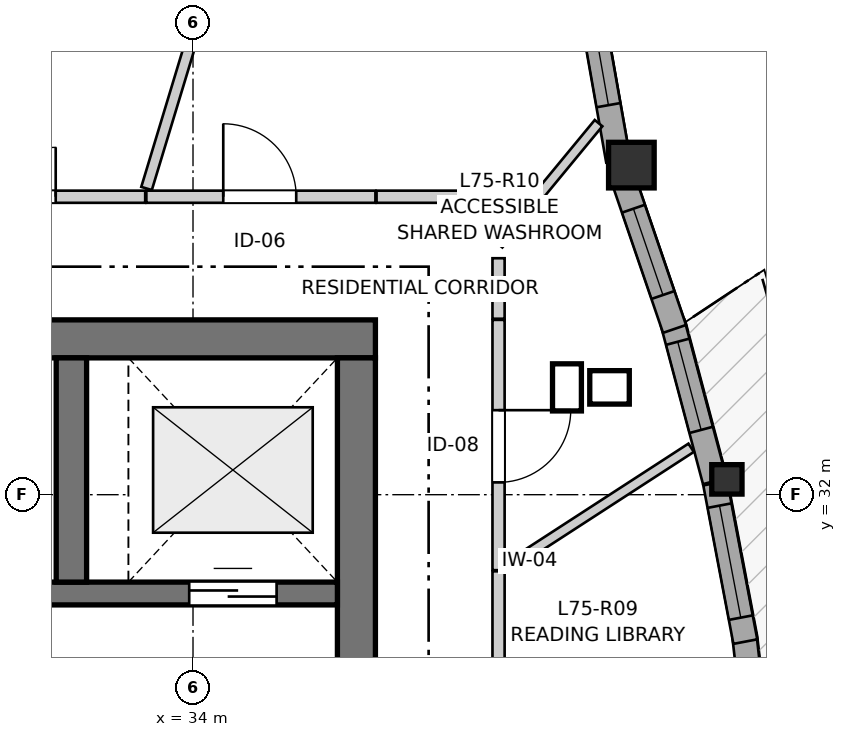
"""IFC4 building model, lengths in metres.
Left out: names, types, materials, properties, quantities, classifications, styles, units other than length and angle.
Written with IfcOpenShell. Run it as: python <this file> out.ifc"""

import sys

from ifc_helpers import new_model, si_unit, direction, frame, frame_2d, origin, origin_2d, place, context, subcontext, project, spatial, rectangle, i_section, extrude, source, transform, mapped, element, fill, save


model = new_model("IFC4")
c1 = context("Model", 3, precision=1e-05, world=origin(), true_north=direction((0.0, 1.0)))
c2 = subcontext(c1, "Body", "Model", "MODEL_VIEW")
j1 = project(units=[si_unit("LENGTHUNIT", "METRE"), si_unit("PLANEANGLEUNIT", "RADIAN")], contexts=[c1])
p1 = place(None, origin())
s1 = spatial("IfcSite", under=j1, at=p1, CompositionType="ELEMENT")
p2 = place(p1, origin())
s2 = spatial("IfcBuilding", under=s1, at=p2, CompositionType="ELEMENT")
p3 = place(p2, frame((0.0, 0.0, 250.0)))
s3 = spatial("IfcBuildingStorey", under=s2, at=p3, CompositionType="ELEMENT", Elevation=250.0)
p4 = place(p3, frame((36.4, 34.05, 0.0), z_axis=(0.0, 0.0, 1.0), x_axis=(-1.0, 0.0, 0.0)))
e1 = element("IfcWall", 1, at=p4, inside=s3, PredefinedType="SHEAR", context=c2, shape_type="SweptSolid", body=[
    extrude(rectangle(XDim=12.1, YDim=0.5, at=frame_2d((6.05, 0.0))), origin(), (0.0, 0.0, 1.0), 2.95),
])
p5 = place(p3, frame((36.15, 18.2, 0.0), z_axis=(0.0, 0.0, 1.0), x_axis=(0.0, 1.0, 0.0)))
e2 = element("IfcWall", 2, at=p5, inside=s3, PredefinedType="SHEAR", context=c2, shape_type="SweptSolid", body=[
    extrude(rectangle(XDim=15.6, YDim=0.5, at=frame_2d((7.8, 0.0))), origin(), (0.0, 0.0, 1.0), 2.95),
])
p6 = place(p5, frame((4.25, 0.0, 0.0)))
e3 = element("IfcOpeningElement", 3, at=p6, cuts=e2, PredefinedType="OPENING", context=c2, shape_type="SweptSolid", body=[
    extrude(rectangle(XDim=1.1, YDim=2.15, at=frame_2d((0.55, 1.075))), frame((0.0, 0.26, 0.0), z_axis=(0.0, -1.0, 0.0), x_axis=(1.0, 0.0, 0.0)), (0.0, 0.0, 1.0), 0.52),
])
p7 = place(p5, frame((10.25, 0.0, 0.0)))
e4 = element("IfcOpeningElement", 4, at=p7, cuts=e2, PredefinedType="OPENING", context=c2, shape_type="SweptSolid", body=[
    extrude(rectangle(XDim=1.1, YDim=2.15, at=frame_2d((0.55, 1.075))), frame((0.0, 0.26, 0.0), z_axis=(0.0, -1.0, 0.0), x_axis=(1.0, 0.0, 0.0)), (0.0, 0.0, 1.0), 0.52),
])
p8 = place(p3, frame((24.8, 30.7, 0.0), z_axis=(0.0, 0.0, 1.0), x_axis=(1.0, 0.0, 0.0)))
e5 = element("IfcWall", 5, at=p8, inside=s3, PredefinedType="SHEAR", context=c2, shape_type="SweptSolid", body=[
    extrude(rectangle(XDim=11.1, YDim=0.3, at=frame_2d((5.55, 0.0))), origin(), (0.0, 0.0, 1.0), 2.95),
])
p9 = place(p8, frame((6.22, 0.0, 0.0)))
e6 = element("IfcOpeningElement", 6, at=p9, cuts=e5, PredefinedType="OPENING", context=c2, shape_type="SweptSolid", body=[
    extrude(rectangle(XDim=0.98, YDim=2.15, at=frame_2d((0.49, 1.075))), frame((0.0, 0.16, 0.0), z_axis=(0.0, -1.0, 0.0), x_axis=(1.0, 0.0, 0.0)), (0.0, 0.0, 1.0), 0.32),
])
p10 = place(p8, frame((9.15, 0.0, 0.0)))
e7 = element("IfcOpeningElement", 7, at=p10, cuts=e5, PredefinedType="OPENING", context=c2, shape_type="SweptSolid", body=[
    extrude(rectangle(XDim=1.15, YDim=2.15, at=frame_2d((0.575, 1.075))), frame((0.0, 0.16, 0.0), z_axis=(0.0, -1.0, 0.0), x_axis=(1.0, 0.0, 0.0)), (0.0, 0.0, 1.0), 0.32),
])
p11 = place(p3, frame((32.4, 30.85, 0.0), z_axis=(0.0, 0.0, 1.0), x_axis=(0.0, 1.0, 0.0)))
e8 = element("IfcWall", 8, at=p11, inside=s3, PredefinedType="SHEAR", context=c2, shape_type="SweptSolid", body=[
    extrude(rectangle(XDim=2.95, YDim=0.4, at=frame_2d((1.475, 0.0))), origin(), (0.0, 0.0, 1.0), 2.95),
])
m1 = source(origin(), c2, "Body", "SweptSolid", [
    extrude(i_section(OverallWidth=0.398, OverallDepth=0.387, WebThickness=0.019, FlangeThickness=0.03, FilletRadius=0.015, at=origin_2d()), origin(), (0.0, 0.0, 1.0), 2.95),
])
p12 = place(p3, frame((41.024, 32.202, 0.0), z_axis=(0.0, 0.0, 1.0), x_axis=(1.0, 0.0, 0.0)))
e9 = element("IfcColumn", 9, at=p12, inside=s3, PredefinedType="PILASTER", context=c2, shape_type="MappedRepresentation", body=[
    mapped(m1, transform((0.0, 0.0, 0.0), x_axis=(1.0, 0.0, 0.0), y_axis=(0.0, 1.0, 0.0), z_axis=(0.0, 0.0, 1.0), scale=1.0)),
])
m2 = source(origin(), c2, "Body", "SweptSolid", [
    extrude(rectangle(XDim=0.6, YDim=0.6, at=origin_2d()), origin(), (0.0, 0.0, 1.0), 2.95),
])
p13 = place(p3, frame((39.768, 36.336, 0.0), z_axis=(0.0, 0.0, 1.0), x_axis=(1.0, 0.0, 0.0)))
e10 = element("IfcColumn", 10, at=p13, inside=s3, PredefinedType="COLUMN", context=c2, shape_type="MappedRepresentation", body=[
    mapped(m2, transform((0.0, 0.0, 0.0), x_axis=(1.0, 0.0, 0.0), y_axis=(0.0, 1.0, 0.0), z_axis=(0.0, 0.0, 1.0), scale=1.0)),
])
p14 = place(p3, frame((41.484, 28.138, 0.0), z_axis=(0.0, 0.0, 1.0), x_axis=(-0.113244511591, 0.993567149515, 0.0)))
e11 = element("IfcWall", 11, at=p14, inside=s3, PredefinedType="SOLIDWALL", context=c2, shape_type="SweptSolid", body=[
    extrude(rectangle(XDim=2.029, YDim=0.32, at=frame_2d((1.014, 0.0))), origin(), (0.0, 0.0, 1.0), 2.57),
])
p15 = place(p14, frame((0.384, 0.0, 0.82)))
e12 = element("IfcOpeningElement", 12, at=p15, cuts=e11, PredefinedType="OPENING", context=c2, shape_type="SweptSolid", body=[
    extrude(rectangle(XDim=1.25, YDim=1.35, at=frame_2d((0.625, 0.675))), frame((0.0, 0.17, 0.0), z_axis=(0.0, -1.0, 0.0), x_axis=(1.0, 0.0, 0.0)), (0.0, 0.0, 1.0), 0.34),
])
p16 = place(p3, frame((41.267, 30.067, 0.0), z_axis=(0.0, 0.0, 1.0), x_axis=(-0.186705057177, 0.982416012504, 0.0)))
e13 = element("IfcWall", 13, at=p16, inside=s3, PredefinedType="SOLIDWALL", context=c2, shape_type="SweptSolid", body=[
    extrude(rectangle(XDim=2.122, YDim=0.32, at=frame_2d((1.061, 0.0))), origin(), (0.0, 0.0, 1.0), 2.57),
])
p17 = place(p16, frame((0.321, 0.0, 0.82)))
e14 = element("IfcOpeningElement", 14, at=p17, cuts=e13, PredefinedType="OPENING", context=c2, shape_type="SweptSolid", body=[
    extrude(rectangle(XDim=1.5, YDim=1.45, at=frame_2d((0.75, 0.725))), frame((0.0, 0.17, 0.0), z_axis=(0.0, -1.0, 0.0), x_axis=(1.0, 0.0, 0.0)), (0.0, 0.0, 1.0), 0.34),
])
p18 = place(p3, frame((40.865, 32.18, 0.0), z_axis=(0.0, 0.0, 1.0), x_axis=(-0.257021579051, 0.966405664254, 0.0)))
e15 = element("IfcWall", 15, at=p18, inside=s3, PredefinedType="SOLIDWALL", context=c2, shape_type="SweptSolid", body=[
    extrude(rectangle(XDim=2.157, YDim=0.32, at=frame_2d((1.079, 0.0))), origin(), (0.0, 0.0, 1.0), 2.57),
])
p19 = place(p18, frame((0.696, 0.0, 0.82)))
e16 = element("IfcOpeningElement", 16, at=p19, cuts=e15, PredefinedType="OPENING", context=c2, shape_type="SweptSolid", body=[
    extrude(rectangle(XDim=1.2, YDim=1.45, at=frame_2d((0.6, 0.725))), frame((0.0, 0.17, 0.0), z_axis=(0.0, -1.0, 0.0), x_axis=(1.0, 0.0, 0.0)), (0.0, 0.0, 1.0), 0.34),
])
p20 = place(p3, frame((40.335, 34.181, 0.0), z_axis=(0.0, 0.0, 1.0), x_axis=(-0.323601383087, 0.946193502865, 0.0)))
e17 = element("IfcWall", 17, at=p20, inside=s3, PredefinedType="SOLIDWALL", context=c2, shape_type="SweptSolid", body=[
    extrude(rectangle(XDim=2.133, YDim=0.32, at=frame_2d((1.066, 0.0))), origin(), (0.0, 0.0, 1.0), 2.57),
])
p21 = place(p20, frame((0.471, 0.0, 0.82)))
e18 = element("IfcOpeningElement", 18, at=p21, cuts=e17, PredefinedType="OPENING", context=c2, shape_type="SweptSolid", body=[
    extrude(rectangle(XDim=1.2, YDim=1.45, at=frame_2d((0.6, 0.725))), frame((0.0, 0.17, 0.0), z_axis=(0.0, -1.0, 0.0), x_axis=(1.0, 0.0, 0.0)), (0.0, 0.0, 1.0), 0.34),
])
p22 = place(p3, frame((39.594, 36.397, 0.0), z_axis=(0.0, 0.0, 1.0), x_axis=(-0.173671780312, 0.984803590937, 0.0)))
e19 = element("IfcWall", 19, at=p22, inside=s3, PredefinedType="SOLIDWALL", context=c2, shape_type="SweptSolid", body=[
    extrude(rectangle(XDim=1.962, YDim=0.32, at=frame_2d((0.981, 0.0))), origin(), (0.0, 0.0, 1.0), 2.57),
])
p23 = place(p22, frame((0.739, 0.0, 0.82)))
e20 = element("IfcOpeningElement", 20, at=p23, cuts=e19, PredefinedType="OPENING", context=c2, shape_type="SweptSolid", body=[
    extrude(rectangle(XDim=0.95, YDim=1.35, at=frame_2d((0.475, 0.675))), frame((0.0, 0.17, 0.0), z_axis=(0.0, -1.0, 0.0), x_axis=(1.0, 0.0, 0.0)), (0.0, 0.0, 1.0), 0.34),
])
p24 = place(p3, frame((38.02, 30.992, 0.0), z_axis=(0.0, 0.0, 1.0), x_axis=(0.0, -1.0, 0.0)))
e21 = element("IfcWall", 21, at=p24, inside=s3, PredefinedType="PARTITIONING", context=c2, shape_type="SweptSolid", body=[
    extrude(rectangle(XDim=5.183, YDim=0.16, at=frame_2d((2.591, 0.0))), origin(), (0.0, 0.0, 1.0), 2.618),
])
p25 = place(p24, frame((2.113, 0.0, 0.0)))
e22 = element("IfcOpeningElement", 22, at=p25, cuts=e21, PredefinedType="OPENING", context=c2, shape_type="SweptSolid", body=[
    extrude(rectangle(XDim=0.96, YDim=2.1, at=frame_2d((0.48, 1.05))), frame((0.0, 0.09, 0.0), z_axis=(0.0, -1.0, 0.0), x_axis=(1.0, 0.0, 0.0)), (0.0, 0.0, 1.0), 0.18),
])
p26 = place(p3, frame((29.761, 35.92, 0.0), z_axis=(0.0, 0.0, 1.0), x_axis=(1.0, 0.0, 0.0)))
e23 = element("IfcWall", 23, at=p26, inside=s3, PredefinedType="PARTITIONING", context=c2, shape_type="SweptSolid", body=[
    extrude(rectangle(XDim=3.61, YDim=0.16, at=frame_2d((1.805, 0.0))), origin(), (0.0, 0.0, 1.0), 2.95),
])
p27 = place(p26, frame((1.133, 0.0, 0.0)))
e24 = element("IfcOpeningElement", 24, at=p27, cuts=e23, PredefinedType="OPENING", context=c2, shape_type="SweptSolid", body=[
    extrude(rectangle(XDim=1.3, YDim=2.1, at=frame_2d((0.65, 1.05))), frame((0.0, 0.09, 0.0), z_axis=(0.0, -1.0, 0.0), x_axis=(1.0, 0.0, 0.0)), (0.0, 0.0, 1.0), 0.18),
])
p28 = place(p3, frame((38.02, 34.3, 0.0), z_axis=(0.0, 0.0, 1.0), x_axis=(0.0, -1.0, 0.0)))
e25 = element("IfcWall", 25, at=p28, inside=s3, PredefinedType="PARTITIONING", context=c2, shape_type="SweptSolid", body=[
    extrude(rectangle(XDim=3.293, YDim=0.16, at=frame_2d((1.646, 0.0))), origin(), (0.0, 0.0, 1.0), 2.618),
])
p29 = place(p28, frame((1.188, 0.0, 0.0)))
e26 = element("IfcOpeningElement", 26, at=p29, cuts=e25, PredefinedType="OPENING", context=c2, shape_type="SweptSolid", body=[
    extrude(rectangle(XDim=0.95, YDim=2.1, at=frame_2d((0.475, 1.05))), frame((0.0, 0.09, 0.0), z_axis=(0.0, -1.0, 0.0), x_axis=(1.0, 0.0, 0.0)), (0.0, 0.0, 1.0), 0.18),
])
p30 = place(p3, frame((33.386, 35.92, 0.0), z_axis=(0.0, 0.0, 1.0), x_axis=(1.0, 0.0, 0.0)))
e27 = element("IfcWall", 27, at=p30, inside=s3, PredefinedType="PARTITIONING", context=c2, shape_type="SweptSolid", body=[
    extrude(rectangle(XDim=3.014, YDim=0.16, at=frame_2d((1.507, 0.0))), origin(), (0.0, 0.0, 1.0), 2.588),
])
p31 = place(p30, frame((1.012, 0.0, 0.0)))
e28 = element("IfcOpeningElement", 28, at=p31, cuts=e27, PredefinedType="OPENING", context=c2, shape_type="SweptSolid", body=[
    extrude(rectangle(XDim=0.96, YDim=2.1, at=frame_2d((0.48, 1.05))), frame((0.0, 0.09, 0.0), z_axis=(0.0, -1.0, 0.0), x_axis=(1.0, 0.0, 0.0)), (0.0, 0.0, 1.0), 0.18),
])
p32 = place(p3, frame((33.389, 36.029, 0.0), z_axis=(0.0, 0.0, 1.0), x_axis=(0.289965875663, 0.957036985153, 0.0)))
e29 = element("IfcWall", 29, at=p32, inside=s3, PredefinedType="PARTITIONING", context=c2, shape_type="SweptSolid", body=[
    extrude(rectangle(XDim=5.875, YDim=0.145, at=frame_2d((2.938, 0.0))), origin(), (0.0, 0.0, 1.0), 2.95),
])
p33 = place(p3, frame((38.142, 31.053, 0.0), z_axis=(0.0, 0.0, 1.0), x_axis=(0.839000059055, 0.544131326892, 0.0)))
e30 = element("IfcWall", 30, at=p33, inside=s3, PredefinedType="PARTITIONING", context=c2, shape_type="SweptSolid", body=[
    extrude(rectangle(XDim=2.875, YDim=0.13, at=frame_2d((1.438, 0.0))), origin(), (0.0, 0.0, 1.0), 2.95),
])
p34 = place(p3, frame((38.02, 35.294, 0.0), z_axis=(0.0, 0.0, 1.0), x_axis=(0.636518208935, 0.771261673943, 0.0)))
e31 = element("IfcWall", 31, at=p34, inside=s3, PredefinedType="PARTITIONING", context=c2, shape_type="SweptSolid", body=[
    extrude(rectangle(XDim=2.067, YDim=0.13, at=frame_2d((1.034, 0.0))), origin(), (0.0, 0.0, 1.0), 2.95),
])
p35 = place(p3, frame((36.415, 35.92, 0.0), z_axis=(0.0, 0.0, 1.0), x_axis=(1.0, 0.0, 0.0)))
e32 = element("IfcWall", 32, at=p35, inside=s3, PredefinedType="PARTITIONING", context=c2, shape_type="SweptSolid", body=[
    extrude(rectangle(XDim=1.605, YDim=0.16, at=frame_2d((0.802, 0.0))), origin(), (0.0, 0.0, 1.0), 2.588),
])
p36 = place(p3, frame((38.02, 34.315, 0.0), z_axis=(0.0, 0.0, 1.0), x_axis=(0.0, 1.0, 0.0)))
e33 = element("IfcWall", 33, at=p36, inside=s3, PredefinedType="PARTITIONING", context=c2, shape_type="SweptSolid", body=[
    extrude(rectangle(XDim=0.796, YDim=0.16, at=frame_2d((0.398, 0.0))), origin(), (0.0, 0.0, 1.0), 2.95),
])
p37 = place(p3, frame((38.02, 35.423, 0.0), z_axis=(0.0, 0.0, 1.0), x_axis=(0.0, 1.0, 0.0)))
e34 = element("IfcWall", 34, at=p37, inside=s3, PredefinedType="PARTITIONING", context=c2, shape_type="SweptSolid", body=[
    extrude(rectangle(XDim=0.497, YDim=0.16, at=frame_2d((0.249, 0.0))), origin(), (0.0, 0.0, 1.0), 2.95),
])
m3 = source(origin(), c2, "Body", "SweptSolid", [
    extrude(rectangle(XDim=1.5, YDim=1.45, at=frame_2d((0.75, 0.725))), frame((0.0, 0.03, 0.0), z_axis=(0.0, -1.0, 0.0), x_axis=(1.0, 0.0, 0.0)), (0.0, 0.0, 1.0), 0.06),
])
p38 = place(p17, origin())
e35 = element("IfcWindow", 35, at=p38, inside=s3, PartitioningType="SINGLE_PANEL", PredefinedType="WINDOW", context=c2, shape_type="MappedRepresentation", body=[
    mapped(m3, transform((0.0, 0.0, 0.0), x_axis=(1.0, 0.0, 0.0), y_axis=(0.0, 1.0, 0.0), z_axis=(0.0, 0.0, 1.0), scale=1.0)),
])
fill(e14, e35)
m4 = source(origin(), c2, "Body", "SweptSolid", [
    extrude(rectangle(XDim=1.2, YDim=1.45, at=frame_2d((0.6, 0.725))), frame((0.0, 0.03, 0.0), z_axis=(0.0, -1.0, 0.0), x_axis=(1.0, 0.0, 0.0)), (0.0, 0.0, 1.0), 0.06),
])
p39 = place(p19, origin())
e36 = element("IfcWindow", 36, at=p39, inside=s3, PartitioningType="SINGLE_PANEL", PredefinedType="WINDOW", context=c2, shape_type="MappedRepresentation", body=[
    mapped(m4, transform((0.0, 0.0, 0.0), x_axis=(1.0, 0.0, 0.0), y_axis=(0.0, 1.0, 0.0), z_axis=(0.0, 0.0, 1.0), scale=1.0)),
])
fill(e16, e36)
p40 = place(p21, origin())
e37 = element("IfcWindow", 37, at=p40, inside=s3, PartitioningType="SINGLE_PANEL", PredefinedType="WINDOW", context=c2, shape_type="MappedRepresentation", body=[
    mapped(m4, transform((0.0, 0.0, 0.0), x_axis=(1.0, 0.0, 0.0), y_axis=(0.0, 1.0, 0.0), z_axis=(0.0, 0.0, 1.0), scale=1.0)),
])
fill(e18, e37)
m5 = source(origin(), c2, "Body", "SweptSolid", [
    extrude(rectangle(XDim=0.95, YDim=1.35, at=frame_2d((0.475, 0.675))), frame((0.0, 0.03, 0.0), z_axis=(0.0, -1.0, 0.0), x_axis=(1.0, 0.0, 0.0)), (0.0, 0.0, 1.0), 0.06),
])
p41 = place(p23, origin())
e38 = element("IfcWindow", 38, at=p41, inside=s3, PartitioningType="SINGLE_PANEL", PredefinedType="WINDOW", context=c2, shape_type="MappedRepresentation", body=[
    mapped(m5, transform((0.0, 0.0, 0.0), x_axis=(1.0, 0.0, 0.0), y_axis=(0.0, 1.0, 0.0), z_axis=(0.0, 0.0, 1.0), scale=1.0)),
])
fill(e20, e38)
m6 = source(origin(), c2, "Body", "SweptSolid", [
    extrude(rectangle(XDim=1.15, YDim=2.15, at=frame_2d((0.575, 1.075))), frame((0.0, 0.025, 0.0), z_axis=(0.0, -1.0, 0.0), x_axis=(1.0, 0.0, 0.0)), (0.0, 0.0, 1.0), 0.05),
])
p42 = place(p10, origin())
e39 = element("IfcDoor", 39, at=p42, inside=s3, OperationType="DOUBLE_DOOR_SLIDING", PredefinedType="DOOR", context=c2, shape_type="MappedRepresentation", body=[
    mapped(m6, transform((0.0, 0.0, 0.0), x_axis=(1.0, 0.0, 0.0), y_axis=(0.0, 1.0, 0.0), z_axis=(0.0, 0.0, 1.0), scale=1.0)),
])
fill(e7, e39)
m7 = source(origin(), c2, "Body", "SweptSolid", [
    extrude(rectangle(XDim=1.3, YDim=2.1, at=frame_2d((0.65, 1.05))), frame((0.0, 0.025, 0.0), z_axis=(0.0, -1.0, 0.0), x_axis=(1.0, 0.0, 0.0)), (0.0, 0.0, 1.0), 0.05),
])
p43 = place(p27, origin())
e40 = element("IfcDoor", 40, at=p43, inside=s3, OperationType="DOUBLE_DOOR_SINGLE_SWING", PredefinedType="DOOR", context=c2, shape_type="MappedRepresentation", body=[
    mapped(m7, transform((0.0, 0.0, 0.0), x_axis=(1.0, 0.0, 0.0), y_axis=(0.0, 1.0, 0.0), z_axis=(0.0, 0.0, 1.0), scale=1.0)),
])
fill(e24, e40)
m8 = source(origin(), c2, "Body", "SweptSolid", [
    extrude(rectangle(XDim=0.95, YDim=2.1, at=frame_2d((0.475, 1.05))), frame((0.0, 0.025, 0.0), z_axis=(0.0, -1.0, 0.0), x_axis=(1.0, 0.0, 0.0)), (0.0, 0.0, 1.0), 0.05),
])
p44 = place(p29, origin())
e41 = element("IfcDoor", 41, at=p44, inside=s3, OperationType="SINGLE_SWING_LEFT", PredefinedType="DOOR", context=c2, shape_type="MappedRepresentation", body=[
    mapped(m8, transform((0.0, 0.0, 0.0), x_axis=(1.0, 0.0, 0.0), y_axis=(0.0, 1.0, 0.0), z_axis=(0.0, 0.0, 1.0), scale=1.0)),
])
fill(e26, e41)
m9 = source(origin(), c2, "Body", "SweptSolid", [
    extrude(rectangle(XDim=0.96, YDim=2.1, at=frame_2d((0.48, 1.05))), frame((0.0, 0.025, 0.0), z_axis=(0.0, -1.0, 0.0), x_axis=(1.0, 0.0, 0.0)), (0.0, 0.0, 1.0), 0.05),
])
p45 = place(p31, origin())
e42 = element("IfcDoor", 42, at=p45, inside=s3, OperationType="SINGLE_SWING_LEFT", PredefinedType="DOOR", context=c2, shape_type="MappedRepresentation", body=[
    mapped(m9, transform((0.0, 0.0, 0.0), x_axis=(1.0, 0.0, 0.0), y_axis=(0.0, 1.0, 0.0), z_axis=(0.0, 0.0, 1.0), scale=1.0)),
])
fill(e28, e42)
save(model, sys.argv[1])
